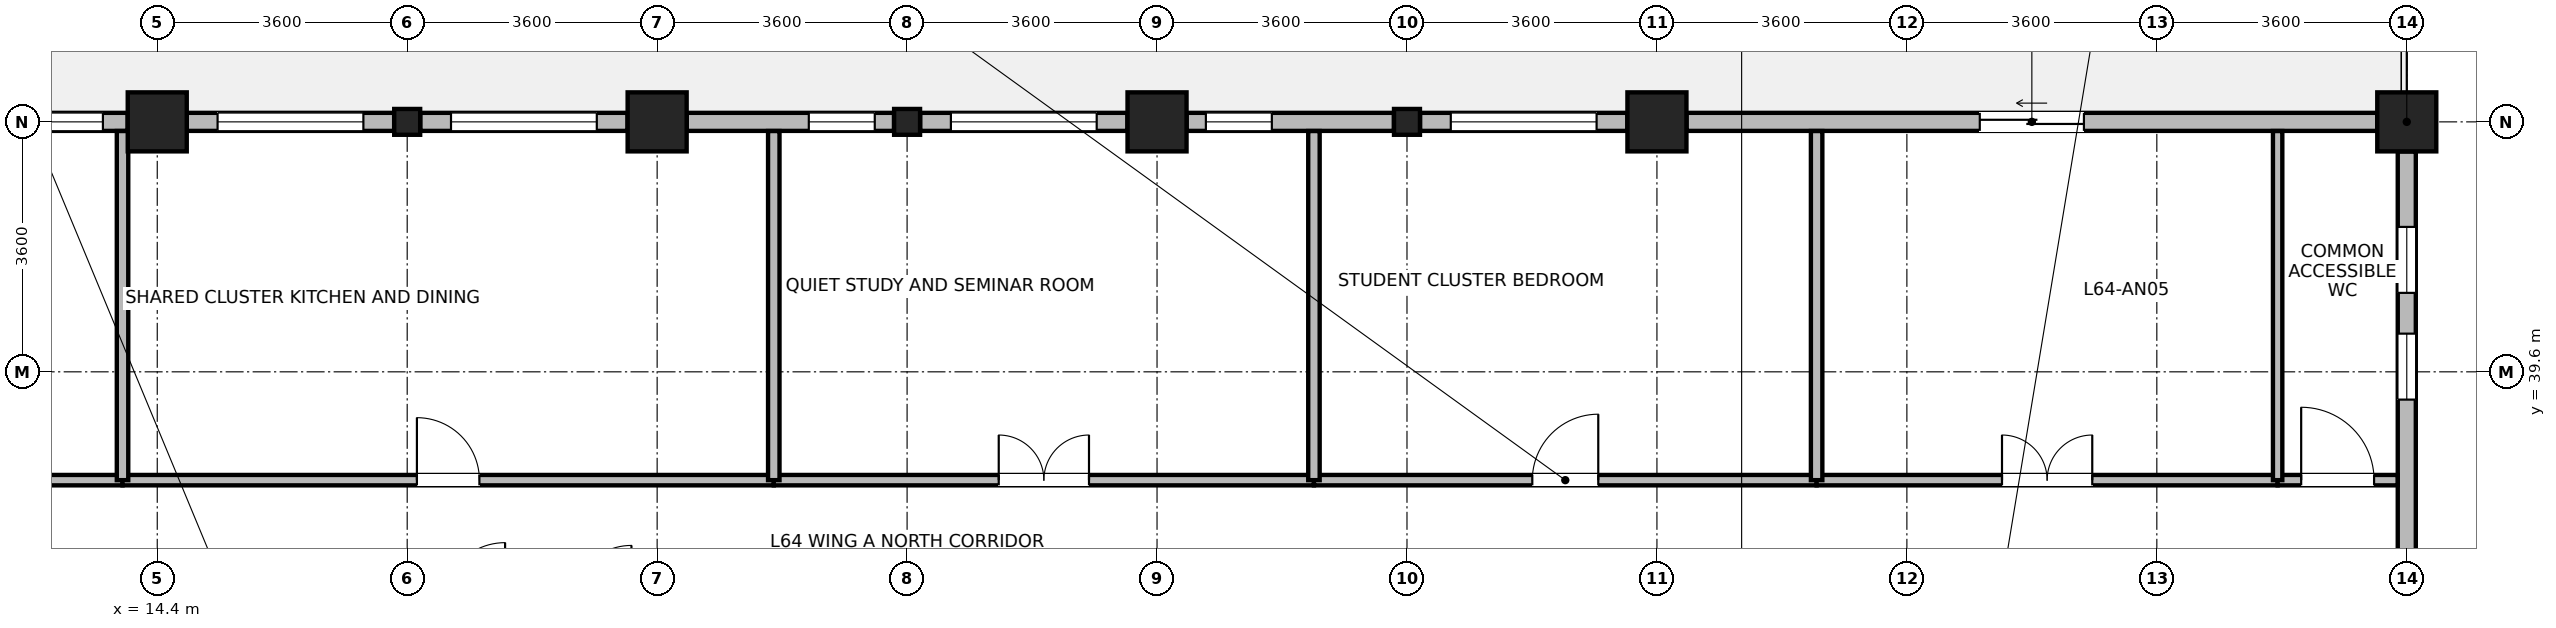
"""IFC4 building model, lengths in metres.
Left out: names, types, materials, properties, quantities, classifications, styles, units other than length and angle.
Written with IfcOpenShell. Run it as: python <this file> out.ifc"""

import sys

from ifc_helpers import new_model, si_unit, direction, frame, frame_2d, origin, origin_2d, place, context, subcontext, project, spatial, rectangle, i_section, extrude, source, transform, mapped, element, fill, save


model = new_model("IFC4")
c1 = context("Model", 3, precision=1e-05, world=origin(), true_north=direction((0.0, 1.0)))
c2 = subcontext(c1, "Body", "Model", "MODEL_VIEW")
j1 = project(units=[si_unit("LENGTHUNIT", "METRE"), si_unit("PLANEANGLEUNIT", "RADIAN")], contexts=[c1])
p1 = place(None, origin())
s1 = spatial("IfcSite", under=j1, at=p1, CompositionType="ELEMENT")
p2 = place(p1, origin())
s2 = spatial("IfcBuilding", under=s1, at=p2, CompositionType="ELEMENT")
p3 = place(p2, frame((0.0, 0.0, 249.9)))
s3 = spatial("IfcBuildingStorey", under=s2, at=p3, CompositionType="ELEMENT", Elevation=249.9)
m1 = source(origin(), c2, "Body", "SweptSolid", [
    extrude(rectangle(XDim=0.85, YDim=0.85, at=origin_2d()), origin(), (0.0, 0.0, 1.0), 3.7),
])
for number, where, z_axis, x_axis in (
    (1, (14.4, 43.2, 0.0), (0.0, 0.0, 1.0), (1.0, 0.0, 0.0)),
    (2, (21.6, 43.2, 0.0), (0.0, 0.0, 1.0), (1.0, 0.0, 0.0)),
    (3, (28.8, 43.2, 0.0), (0.0, 0.0, 1.0), (1.0, 0.0, 0.0)),
    (4, (36.0, 43.2, 0.0), (0.0, 0.0, 1.0), (1.0, 0.0, 0.0)),
    (5, (46.8, 43.2, 0.0), (0.0, 0.0, 1.0), (1.0, 0.0, 0.0)),
):
    element("IfcColumn", number, at=place(p3, frame(where, z_axis=z_axis, x_axis=x_axis)), inside=s3, PredefinedType="COLUMN", context=c2, shape_type="MappedRepresentation", body=[
        mapped(m1, transform((0.0, 0.0, 0.0), x_axis=(1.0, 0.0, 0.0), y_axis=(0.0, 1.0, 0.0), z_axis=(0.0, 0.0, 1.0), scale=1.0)),
    ])
m2 = source(origin(), c2, "Body", "SweptSolid", [
    extrude(i_section(OverallWidth=0.374, OverallDepth=0.372, WebThickness=0.015, FlangeThickness=0.026, FilletRadius=0.015, at=origin_2d()), origin(), (0.0, 0.0, 1.0), 3.7),
])
for number, where, z_axis, x_axis in (
    (6, (18.0, 43.2, 0.0), (0.0, 0.0, 1.0), (1.0, 0.0, 0.0)),
    (7, (25.2, 43.2, 0.0), (0.0, 0.0, 1.0), (1.0, 0.0, 0.0)),
    (8, (32.4, 43.2, 0.0), (0.0, 0.0, 1.0), (1.0, 0.0, 0.0)),
):
    element("IfcColumn", number, at=place(p3, frame(where, z_axis=z_axis, x_axis=x_axis)), inside=s3, PredefinedType="COLUMN", context=c2, shape_type="MappedRepresentation", body=[
        mapped(m2, transform((0.0, 0.0, 0.0), x_axis=(1.0, 0.0, 0.0), y_axis=(0.0, 1.0, 0.0), z_axis=(0.0, 0.0, 1.0), scale=1.0)),
    ])
p4 = place(p3, frame((46.8, 42.774, 0.0), z_axis=(0.0, 0.0, 1.0), x_axis=(0.0, -1.0, 0.0)))
e9 = element("IfcWall", 9, at=p4, inside=s3, PredefinedType="STANDARD", context=c2, shape_type="SweptSolid", body=[
    extrude(rectangle(XDim=6.198, YDim=0.26, at=frame_2d((3.099, 0.0))), origin(), (0.0, 0.0, 1.0), 3.055),
])
p5 = place(p4, frame((2.624, 0.0, 0.85)))
e10 = element("IfcOpeningElement", 10, at=p5, cuts=e9, PredefinedType="OPENING", context=c2, shape_type="SweptSolid", body=[
    extrude(rectangle(XDim=0.95, YDim=1.75, at=frame_2d((0.475, 0.875))), frame((0.0, 0.14, 0.0), z_axis=(0.0, -1.0, 0.0), x_axis=(1.0, 0.0, 0.0)), (0.0, 0.0, 1.0), 0.28),
])
p6 = place(p4, frame((1.087, 0.0, 0.85)))
e11 = element("IfcOpeningElement", 11, at=p6, cuts=e9, PredefinedType="OPENING", context=c2, shape_type="SweptSolid", body=[
    extrude(rectangle(XDim=0.95, YDim=1.75, at=frame_2d((0.475, 0.875))), frame((0.0, 0.14, 0.0), z_axis=(0.0, -1.0, 0.0), x_axis=(1.0, 0.0, 0.0)), (0.0, 0.0, 1.0), 0.28),
])
p7 = place(p3, frame((36.426, 43.2, 0.0), z_axis=(0.0, 0.0, 1.0), x_axis=(1.0, 0.0, 0.0)))
e12 = element("IfcWall", 12, at=p7, inside=s3, PredefinedType="STANDARD", context=c2, shape_type="SweptSolid", body=[
    extrude(rectangle(XDim=9.948, YDim=0.26, at=frame_2d((4.974, 0.0))), origin(), (0.0, 0.0, 1.0), 3.055),
])
p8 = place(p7, frame((4.224, 0.0, 0.0)))
e13 = element("IfcOpeningElement", 13, at=p8, cuts=e12, PredefinedType="OPENING", context=c2, shape_type="SweptSolid", body=[
    extrude(rectangle(XDim=1.5, YDim=2.15, at=frame_2d((0.75, 1.075))), frame((0.0, 0.14, 0.0), z_axis=(0.0, -1.0, 0.0), x_axis=(1.0, 0.0, 0.0)), (0.0, 0.0, 1.0), 0.28),
])
p9 = place(p3, frame((32.588, 43.2, 0.0), z_axis=(0.0, 0.0, 1.0), x_axis=(1.0, 0.0, 0.0)))
e14 = element("IfcWall", 14, at=p9, inside=s3, PredefinedType="STANDARD", context=c2, shape_type="SweptSolid", body=[
    extrude(rectangle(XDim=2.986, YDim=0.26, at=frame_2d((1.493, 0.0))), origin(), (0.0, 0.0, 1.0), 3.055),
])
p10 = place(p9, frame((0.443, 0.0, 0.85)))
e15 = element("IfcOpeningElement", 15, at=p10, cuts=e14, PredefinedType="OPENING", context=c2, shape_type="SweptSolid", body=[
    extrude(rectangle(XDim=2.1, YDim=1.95, at=frame_2d((1.05, 0.975))), frame((0.0, 0.14, 0.0), z_axis=(0.0, -1.0, 0.0), x_axis=(1.0, 0.0, 0.0)), (0.0, 0.0, 1.0), 0.28),
])
p11 = place(p3, frame((29.226, 43.2, 0.0), z_axis=(0.0, 0.0, 1.0), x_axis=(1.0, 0.0, 0.0)))
e16 = element("IfcWall", 16, at=p11, inside=s3, PredefinedType="STANDARD", context=c2, shape_type="SweptSolid", body=[
    extrude(rectangle(XDim=2.986, YDim=0.26, at=frame_2d((1.493, 0.0))), origin(), (0.0, 0.0, 1.0), 3.055),
])
p12 = place(p11, frame((0.278, 0.0, 0.85)))
e17 = element("IfcOpeningElement", 17, at=p12, cuts=e16, PredefinedType="OPENING", context=c2, shape_type="SweptSolid", body=[
    extrude(rectangle(XDim=0.95, YDim=1.75, at=frame_2d((0.475, 0.875))), frame((0.0, 0.14, 0.0), z_axis=(0.0, -1.0, 0.0), x_axis=(1.0, 0.0, 0.0)), (0.0, 0.0, 1.0), 0.28),
])
p13 = place(p3, frame((25.388, 43.2, 0.0), z_axis=(0.0, 0.0, 1.0), x_axis=(1.0, 0.0, 0.0)))
e18 = element("IfcWall", 18, at=p13, inside=s3, PredefinedType="STANDARD", context=c2, shape_type="SweptSolid", body=[
    extrude(rectangle(XDim=2.986, YDim=0.26, at=frame_2d((1.493, 0.0))), origin(), (0.0, 0.0, 1.0), 3.055),
])
p14 = place(p13, frame((0.443, 0.0, 0.85)))
e19 = element("IfcOpeningElement", 19, at=p14, cuts=e18, PredefinedType="OPENING", context=c2, shape_type="SweptSolid", body=[
    extrude(rectangle(XDim=2.1, YDim=1.95, at=frame_2d((1.05, 0.975))), frame((0.0, 0.14, 0.0), z_axis=(0.0, -1.0, 0.0), x_axis=(1.0, 0.0, 0.0)), (0.0, 0.0, 1.0), 0.28),
])
p15 = place(p3, frame((22.026, 43.2, 0.0), z_axis=(0.0, 0.0, 1.0), x_axis=(1.0, 0.0, 0.0)))
e20 = element("IfcWall", 20, at=p15, inside=s3, PredefinedType="STANDARD", context=c2, shape_type="SweptSolid", body=[
    extrude(rectangle(XDim=2.986, YDim=0.26, at=frame_2d((1.493, 0.0))), origin(), (0.0, 0.0, 1.0), 3.055),
])
p16 = place(p15, frame((1.759, 0.0, 0.85)))
e21 = element("IfcOpeningElement", 21, at=p16, cuts=e20, PredefinedType="OPENING", context=c2, shape_type="SweptSolid", body=[
    extrude(rectangle(XDim=0.95, YDim=1.75, at=frame_2d((0.475, 0.875))), frame((0.0, 0.14, 0.0), z_axis=(0.0, -1.0, 0.0), x_axis=(1.0, 0.0, 0.0)), (0.0, 0.0, 1.0), 0.28),
])
p17 = place(p3, frame((18.188, 43.2, 0.0), z_axis=(0.0, 0.0, 1.0), x_axis=(1.0, 0.0, 0.0)))
e22 = element("IfcWall", 22, at=p17, inside=s3, PredefinedType="STANDARD", context=c2, shape_type="SweptSolid", body=[
    extrude(rectangle(XDim=2.986, YDim=0.26, at=frame_2d((1.493, 0.0))), origin(), (0.0, 0.0, 1.0), 3.055),
])
p18 = place(p17, frame((0.443, 0.0, 0.85)))
e23 = element("IfcOpeningElement", 23, at=p18, cuts=e22, PredefinedType="OPENING", context=c2, shape_type="SweptSolid", body=[
    extrude(rectangle(XDim=2.1, YDim=1.95, at=frame_2d((1.05, 0.975))), frame((0.0, 0.14, 0.0), z_axis=(0.0, -1.0, 0.0), x_axis=(1.0, 0.0, 0.0)), (0.0, 0.0, 1.0), 0.28),
])
p19 = place(p3, frame((14.826, 43.2, 0.0), z_axis=(0.0, 0.0, 1.0), x_axis=(1.0, 0.0, 0.0)))
e24 = element("IfcWall", 24, at=p19, inside=s3, PredefinedType="STANDARD", context=c2, shape_type="SweptSolid", body=[
    extrude(rectangle(XDim=2.986, YDim=0.26, at=frame_2d((1.493, 0.0))), origin(), (0.0, 0.0, 1.0), 3.055),
])
p20 = place(p19, frame((0.443, 0.0, 0.85)))
e25 = element("IfcOpeningElement", 25, at=p20, cuts=e24, PredefinedType="OPENING", context=c2, shape_type="SweptSolid", body=[
    extrude(rectangle(XDim=2.1, YDim=1.95, at=frame_2d((1.05, 0.975))), frame((0.0, 0.14, 0.0), z_axis=(0.0, -1.0, 0.0), x_axis=(1.0, 0.0, 0.0)), (0.0, 0.0, 1.0), 0.28),
])
p21 = place(p3, frame((3.735, 43.2, 0.0), z_axis=(0.0, 0.0, 1.0), x_axis=(1.0, 0.0, 0.0)))
e26 = element("IfcWall", 26, at=p21, inside=s3, PredefinedType="STANDARD", context=c2, shape_type="SweptSolid", body=[
    extrude(rectangle(XDim=10.239, YDim=0.26, at=frame_2d((5.12, 0.0))), origin(), (0.0, 0.0, 1.0), 3.455),
])
p22 = place(p21, frame((0.356, 0.0, 0.85)))
e27 = element("IfcOpeningElement", 27, at=p22, cuts=e26, PredefinedType="OPENING", context=c2, shape_type="SweptSolid", body=[
    extrude(rectangle(XDim=2.7, YDim=2.05, at=frame_2d((1.35, 1.025))), frame((0.0, 0.14, 0.0), z_axis=(0.0, -1.0, 0.0), x_axis=(1.0, 0.0, 0.0)), (0.0, 0.0, 1.0), 0.28),
])
p23 = place(p21, frame((3.77, 0.0, 0.85)))
e28 = element("IfcOpeningElement", 28, at=p23, cuts=e26, PredefinedType="OPENING", context=c2, shape_type="SweptSolid", body=[
    extrude(rectangle(XDim=2.7, YDim=2.05, at=frame_2d((1.35, 1.025))), frame((0.0, 0.14, 0.0), z_axis=(0.0, -1.0, 0.0), x_axis=(1.0, 0.0, 0.0)), (0.0, 0.0, 1.0), 0.28),
])
p24 = place(p21, frame((7.183, 0.0, 0.85)))
e29 = element("IfcOpeningElement", 29, at=p24, cuts=e26, PredefinedType="OPENING", context=c2, shape_type="SweptSolid", body=[
    extrude(rectangle(XDim=2.7, YDim=2.05, at=frame_2d((1.35, 1.025))), frame((0.0, 0.14, 0.0), z_axis=(0.0, -1.0, 0.0), x_axis=(1.0, 0.0, 0.0)), (0.0, 0.0, 1.0), 0.28),
])
p25 = place(p3, frame((3.732, 38.04, 0.0), z_axis=(0.0, 0.0, 1.0), x_axis=(1.0, 0.0, 0.0)))
e30 = element("IfcWall", 30, at=p25, inside=s3, PredefinedType="PARTITIONING", context=c2, shape_type="SweptSolid", body=[
    extrude(rectangle(XDim=10.168, YDim=0.15, at=frame_2d((5.084, 0.0))), origin(), (0.0, 0.0, 1.0), 3.455),
])
p26 = place(p25, frame((4.434, 0.0, 0.0)))
e31 = element("IfcOpeningElement", 31, at=p26, cuts=e30, PredefinedType="OPENING", context=c2, shape_type="SweptSolid", body=[
    extrude(rectangle(XDim=1.3, YDim=2.12, at=frame_2d((0.65, 1.06))), frame((0.0, 0.085, 0.0), z_axis=(0.0, -1.0, 0.0), x_axis=(1.0, 0.0, 0.0)), (0.0, 0.0, 1.0), 0.17),
])
p27 = place(p3, frame((13.9, 38.04, 0.0), z_axis=(0.0, 0.0, 1.0), x_axis=(1.0, 0.0, 0.0)))
e32 = element("IfcWall", 32, at=p27, inside=s3, PredefinedType="PARTITIONING", context=c2, shape_type="SweptSolid", body=[
    extrude(rectangle(XDim=9.38, YDim=0.15, at=frame_2d((4.69, 0.0))), origin(), (0.0, 0.0, 1.0), 3.455),
])
p28 = place(p27, frame((4.24, 0.0, 0.0)))
e33 = element("IfcOpeningElement", 33, at=p28, cuts=e32, PredefinedType="OPENING", context=c2, shape_type="SweptSolid", body=[
    extrude(rectangle(XDim=0.9, YDim=2.08, at=frame_2d((0.45, 1.04))), frame((0.0, 0.085, 0.0), z_axis=(0.0, -1.0, 0.0), x_axis=(1.0, 0.0, 0.0)), (0.0, 0.0, 1.0), 0.17),
])
p29 = place(p3, frame((23.28, 38.04, 0.0), z_axis=(0.0, 0.0, 1.0), x_axis=(1.0, 0.0, 0.0)))
e34 = element("IfcWall", 34, at=p29, inside=s3, PredefinedType="PARTITIONING", context=c2, shape_type="SweptSolid", body=[
    extrude(rectangle(XDim=7.78, YDim=0.15, at=frame_2d((3.89, 0.0))), origin(), (0.0, 0.0, 1.0), 3.455),
])
p30 = place(p29, frame((3.24, 0.0, 0.0)))
e35 = element("IfcOpeningElement", 35, at=p30, cuts=e34, PredefinedType="OPENING", context=c2, shape_type="SweptSolid", body=[
    extrude(rectangle(XDim=1.3, YDim=2.12, at=frame_2d((0.65, 1.06))), frame((0.0, 0.085, 0.0), z_axis=(0.0, -1.0, 0.0), x_axis=(1.0, 0.0, 0.0)), (0.0, 0.0, 1.0), 0.17),
])
p31 = place(p3, frame((31.06, 38.04, 0.0), z_axis=(0.0, 0.0, 1.0), x_axis=(1.0, 0.0, 0.0)))
e36 = element("IfcWall", 36, at=p31, inside=s3, PredefinedType="PARTITIONING", context=c2, shape_type="SweptSolid", body=[
    extrude(rectangle(XDim=7.24, YDim=0.15, at=frame_2d((3.62, 0.0))), origin(), (0.0, 0.0, 1.0), 3.455),
])
p32 = place(p31, frame((3.145, 0.0, 0.0)))
e37 = element("IfcOpeningElement", 37, at=p32, cuts=e36, PredefinedType="OPENING", context=c2, shape_type="SweptSolid", body=[
    extrude(rectangle(XDim=0.95, YDim=2.1, at=frame_2d((0.475, 1.05))), frame((0.0, 0.085, 0.0), z_axis=(0.0, -1.0, 0.0), x_axis=(1.0, 0.0, 0.0)), (0.0, 0.0, 1.0), 0.17),
])
p33 = place(p3, frame((38.3, 38.04, 0.0), z_axis=(0.0, 0.0, 1.0), x_axis=(1.0, 0.0, 0.0)))
e38 = element("IfcWall", 38, at=p33, inside=s3, PredefinedType="PARTITIONING", context=c2, shape_type="SweptSolid", body=[
    extrude(rectangle(XDim=6.64, YDim=0.15, at=frame_2d((3.32, 0.0))), origin(), (0.0, 0.0, 1.0), 3.455),
])
p34 = place(p33, frame((2.67, 0.0, 0.0)))
e39 = element("IfcOpeningElement", 39, at=p34, cuts=e38, PredefinedType="OPENING", context=c2, shape_type="SweptSolid", body=[
    extrude(rectangle(XDim=1.3, YDim=2.12, at=frame_2d((0.65, 1.06))), frame((0.0, 0.085, 0.0), z_axis=(0.0, -1.0, 0.0), x_axis=(1.0, 0.0, 0.0)), (0.0, 0.0, 1.0), 0.17),
])
p35 = place(p3, frame((44.94, 38.04, 0.0), z_axis=(0.0, 0.0, 1.0), x_axis=(1.0, 0.0, 0.0)))
e40 = element("IfcWall", 40, at=p35, inside=s3, PredefinedType="PARTITIONING", context=c2, shape_type="SweptSolid", body=[
    extrude(rectangle(XDim=1.728, YDim=0.15, at=frame_2d((0.864, 0.0))), origin(), (0.0, 0.0, 1.0), 3.455),
])
p36 = place(p35, frame((0.339, 0.0, 0.0)))
e41 = element("IfcOpeningElement", 41, at=p36, cuts=e40, PredefinedType="OPENING", context=c2, shape_type="SweptSolid", body=[
    extrude(rectangle(XDim=1.05, YDim=2.12, at=frame_2d((0.525, 1.06))), frame((0.0, 0.085, 0.0), z_axis=(0.0, -1.0, 0.0), x_axis=(1.0, 0.0, 0.0)), (0.0, 0.0, 1.0), 0.17),
])
for number, where, z_axis, x_axis in (
    (42, (13.9, 38.04, 0.0), (0.0, 0.0, 1.0), (0.0, 1.0, 0.0)),
    (43, (23.28, 38.04, 0.0), (0.0, 0.0, 1.0), (0.0, 1.0, 0.0)),
    (44, (31.06, 38.04, 0.0), (0.0, 0.0, 1.0), (0.0, 1.0, 0.0)),
    (45, (38.3, 38.04, 0.0), (0.0, 0.0, 1.0), (0.0, 1.0, 0.0)),
):
    element("IfcWall", number, at=place(p3, frame(where, z_axis=z_axis, x_axis=x_axis)), inside=s3, PredefinedType="PARTITIONING", context=c2, shape_type="SweptSolid", body=[
        extrude(rectangle(XDim=5.028, YDim=0.165, at=frame_2d((2.514, 0.0))), origin(), (0.0, 0.0, 1.0), 3.455),
    ])
p37 = place(p3, frame((44.94, 38.04, 0.0), z_axis=(0.0, 0.0, 1.0), x_axis=(0.0, 1.0, 0.0)))
e46 = element("IfcWall", 46, at=p37, inside=s3, PredefinedType="PARTITIONING", context=c2, shape_type="SweptSolid", body=[
    extrude(rectangle(XDim=5.028, YDim=0.135, at=frame_2d((2.514, 0.0))), origin(), (0.0, 0.0, 1.0), 3.455),
])
p38 = place(p5, origin())
e47 = element("IfcWindow", 47, at=p38, inside=s3, PartitioningType="SINGLE_PANEL", PredefinedType="WINDOW", context=c2, shape_type="SweptSolid", body=[
    extrude(rectangle(XDim=0.95, YDim=1.75, at=frame_2d((0.475, 0.875))), frame((0.0, 0.03, 0.0), z_axis=(0.0, -1.0, 0.0), x_axis=(1.0, 0.0, 0.0)), (0.0, 0.0, 1.0), 0.06),
])
fill(e10, e47)
p39 = place(p6, origin())
e48 = element("IfcWindow", 48, at=p39, inside=s3, PartitioningType="SINGLE_PANEL", PredefinedType="WINDOW", context=c2, shape_type="SweptSolid", body=[
    extrude(rectangle(XDim=0.95, YDim=1.75, at=frame_2d((0.475, 0.875))), frame((0.0, 0.03, 0.0), z_axis=(0.0, -1.0, 0.0), x_axis=(1.0, 0.0, 0.0)), (0.0, 0.0, 1.0), 0.06),
])
fill(e11, e48)
p40 = place(p8, origin())
e49 = element("IfcDoor", 49, at=p40, inside=s3, OperationType="SLIDING_TO_LEFT", PredefinedType="DOOR", context=c2, shape_type="SweptSolid", body=[
    extrude(rectangle(XDim=1.5, YDim=2.15, at=frame_2d((0.75, 1.075))), frame((0.0, 0.025, 0.0), z_axis=(0.0, -1.0, 0.0), x_axis=(1.0, 0.0, 0.0)), (0.0, 0.0, 1.0), 0.05),
])
fill(e13, e49)
p41 = place(p10, origin())
e50 = element("IfcWindow", 50, at=p41, inside=s3, PartitioningType="SINGLE_PANEL", PredefinedType="WINDOW", context=c2, shape_type="SweptSolid", body=[
    extrude(rectangle(XDim=2.1, YDim=1.95, at=frame_2d((1.05, 0.975))), frame((0.0, 0.03, 0.0), z_axis=(0.0, -1.0, 0.0), x_axis=(1.0, 0.0, 0.0)), (0.0, 0.0, 1.0), 0.06),
])
fill(e15, e50)
p42 = place(p12, origin())
e51 = element("IfcWindow", 51, at=p42, inside=s3, PartitioningType="SINGLE_PANEL", PredefinedType="WINDOW", context=c2, shape_type="SweptSolid", body=[
    extrude(rectangle(XDim=0.95, YDim=1.75, at=frame_2d((0.475, 0.875))), frame((0.0, 0.03, 0.0), z_axis=(0.0, -1.0, 0.0), x_axis=(1.0, 0.0, 0.0)), (0.0, 0.0, 1.0), 0.06),
])
fill(e17, e51)
p43 = place(p14, origin())
e52 = element("IfcWindow", 52, at=p43, inside=s3, PartitioningType="SINGLE_PANEL", PredefinedType="WINDOW", context=c2, shape_type="SweptSolid", body=[
    extrude(rectangle(XDim=2.1, YDim=1.95, at=frame_2d((1.05, 0.975))), frame((0.0, 0.03, 0.0), z_axis=(0.0, -1.0, 0.0), x_axis=(1.0, 0.0, 0.0)), (0.0, 0.0, 1.0), 0.06),
])
fill(e19, e52)
p44 = place(p16, origin())
e53 = element("IfcWindow", 53, at=p44, inside=s3, PartitioningType="SINGLE_PANEL", PredefinedType="WINDOW", context=c2, shape_type="SweptSolid", body=[
    extrude(rectangle(XDim=0.95, YDim=1.75, at=frame_2d((0.475, 0.875))), frame((0.0, 0.03, 0.0), z_axis=(0.0, -1.0, 0.0), x_axis=(1.0, 0.0, 0.0)), (0.0, 0.0, 1.0), 0.06),
])
fill(e21, e53)
p45 = place(p18, origin())
e54 = element("IfcWindow", 54, at=p45, inside=s3, PartitioningType="SINGLE_PANEL", PredefinedType="WINDOW", context=c2, shape_type="SweptSolid", body=[
    extrude(rectangle(XDim=2.1, YDim=1.95, at=frame_2d((1.05, 0.975))), frame((0.0, 0.03, 0.0), z_axis=(0.0, -1.0, 0.0), x_axis=(1.0, 0.0, 0.0)), (0.0, 0.0, 1.0), 0.06),
])
fill(e23, e54)
p46 = place(p20, origin())
e55 = element("IfcWindow", 55, at=p46, inside=s3, PartitioningType="SINGLE_PANEL", PredefinedType="WINDOW", context=c2, shape_type="SweptSolid", body=[
    extrude(rectangle(XDim=2.1, YDim=1.95, at=frame_2d((1.05, 0.975))), frame((0.0, 0.03, 0.0), z_axis=(0.0, -1.0, 0.0), x_axis=(1.0, 0.0, 0.0)), (0.0, 0.0, 1.0), 0.06),
])
fill(e25, e55)
p47 = place(p24, origin())
e56 = element("IfcWindow", 56, at=p47, inside=s3, PartitioningType="SINGLE_PANEL", PredefinedType="WINDOW", context=c2, shape_type="SweptSolid", body=[
    extrude(rectangle(XDim=2.7, YDim=2.05, at=frame_2d((1.35, 1.025))), frame((0.0, 0.03, 0.0), z_axis=(0.0, -1.0, 0.0), x_axis=(1.0, 0.0, 0.0)), (0.0, 0.0, 1.0), 0.06),
])
fill(e29, e56)
p48 = place(p28, origin())
e57 = element("IfcDoor", 57, at=p48, inside=s3, OperationType="SINGLE_SWING_LEFT", PredefinedType="DOOR", context=c2, shape_type="SweptSolid", body=[
    extrude(rectangle(XDim=0.9, YDim=2.08, at=frame_2d((0.45, 1.04))), frame((0.0, 0.025, 0.0), z_axis=(0.0, -1.0, 0.0), x_axis=(1.0, 0.0, 0.0)), (0.0, 0.0, 1.0), 0.05),
])
fill(e33, e57)
p49 = place(p30, origin())
e58 = element("IfcDoor", 58, at=p49, inside=s3, OperationType="DOUBLE_DOOR_SINGLE_SWING", PredefinedType="DOOR", context=c2, shape_type="SweptSolid", body=[
    extrude(rectangle(XDim=1.3, YDim=2.12, at=frame_2d((0.65, 1.06))), frame((0.0, 0.025, 0.0), z_axis=(0.0, -1.0, 0.0), x_axis=(1.0, 0.0, 0.0)), (0.0, 0.0, 1.0), 0.05),
])
fill(e35, e58)
p50 = place(p32, origin())
e59 = element("IfcDoor", 59, at=p50, inside=s3, OperationType="SINGLE_SWING_RIGHT", PredefinedType="DOOR", context=c2, shape_type="SweptSolid", body=[
    extrude(rectangle(XDim=0.95, YDim=2.1, at=frame_2d((0.475, 1.05))), frame((0.0, 0.025, 0.0), z_axis=(0.0, -1.0, 0.0), x_axis=(1.0, 0.0, 0.0)), (0.0, 0.0, 1.0), 0.05),
])
fill(e37, e59)
p51 = place(p34, origin())
e60 = element("IfcDoor", 60, at=p51, inside=s3, OperationType="DOUBLE_DOOR_SINGLE_SWING", PredefinedType="DOOR", context=c2, shape_type="SweptSolid", body=[
    extrude(rectangle(XDim=1.3, YDim=2.12, at=frame_2d((0.65, 1.06))), frame((0.0, 0.025, 0.0), z_axis=(0.0, -1.0, 0.0), x_axis=(1.0, 0.0, 0.0)), (0.0, 0.0, 1.0), 0.05),
])
fill(e39, e60)
p52 = place(p36, origin())
e61 = element("IfcDoor", 61, at=p52, inside=s3, OperationType="SINGLE_SWING_LEFT", PredefinedType="DOOR", context=c2, shape_type="SweptSolid", body=[
    extrude(rectangle(XDim=1.05, YDim=2.12, at=frame_2d((0.525, 1.06))), frame((0.0, 0.025, 0.0), z_axis=(0.0, -1.0, 0.0), x_axis=(1.0, 0.0, 0.0)), (0.0, 0.0, 1.0), 0.05),
])
fill(e41, e61)
save(model, sys.argv[1])
